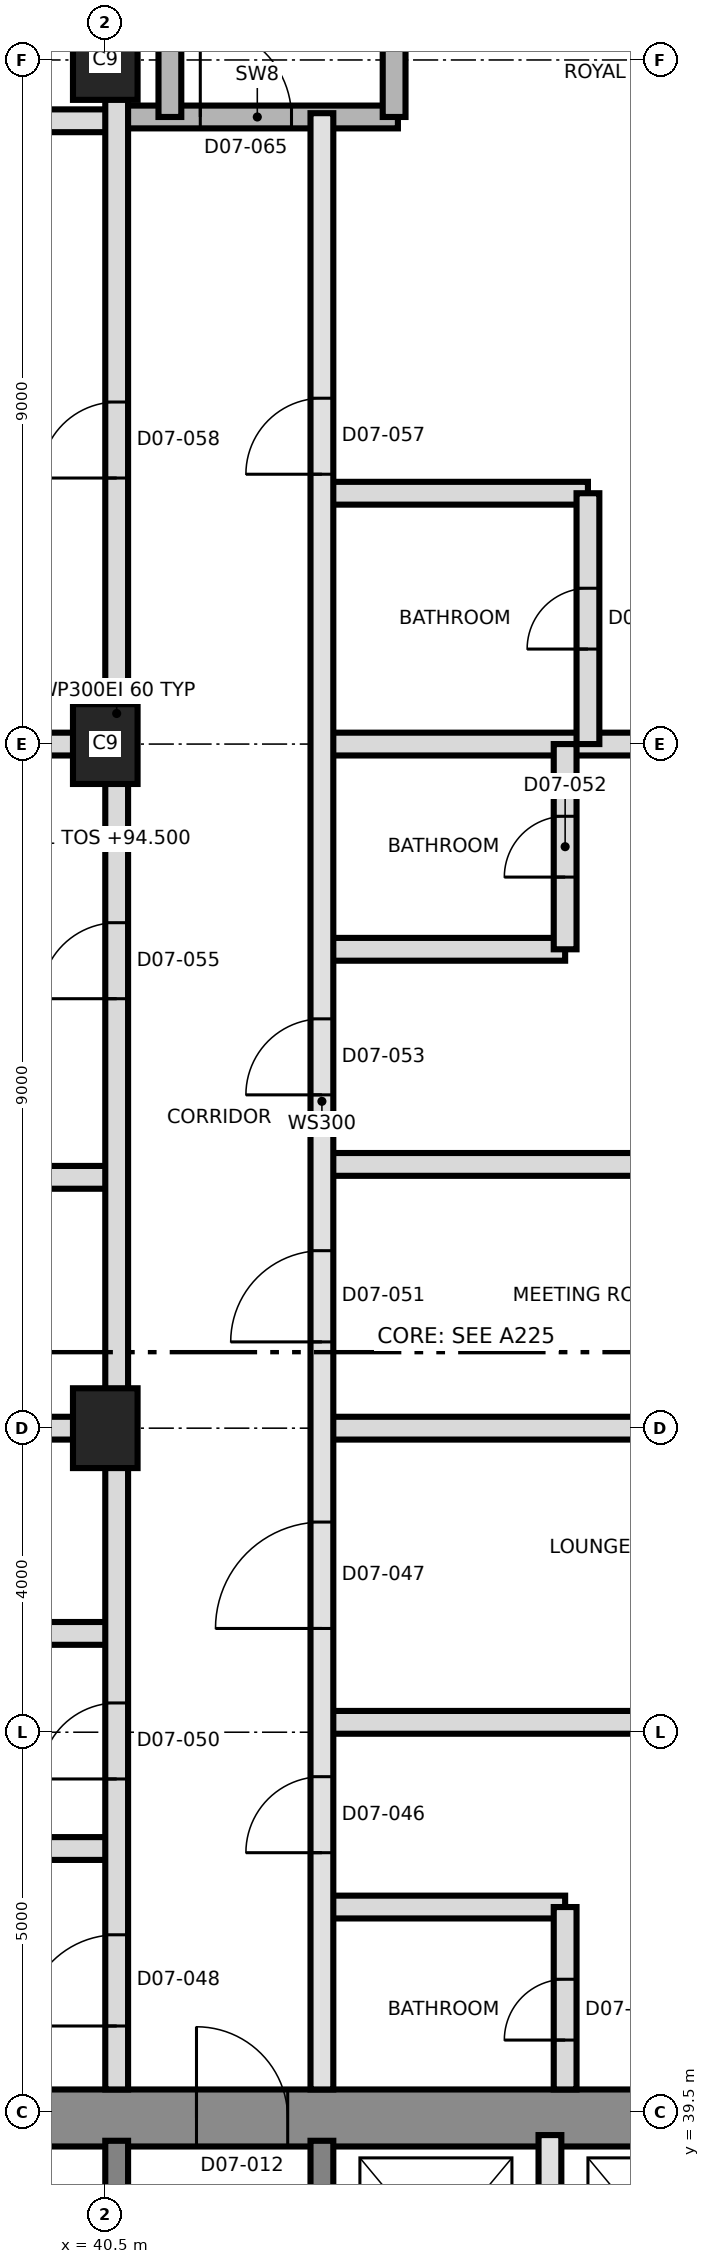
"""IFC4 building model, lengths in metres.
Left out: names, types, materials, properties, quantities, classifications, styles, units other than length and angle.
Written with IfcOpenShell. Run it as: python <this file> out.ifc"""

import sys

from ifc_helpers import new_model, si_unit, direction, frame, frame_2d, origin, origin_2d, place, context, subcontext, project, spatial, rectangle, extrude, element, fill, save


model = new_model("IFC4")
c1 = context("Model", 3, precision=1e-05, world=origin(), true_north=direction((0.0, 1.0)))
c2 = subcontext(c1, "Body", "Model", "MODEL_VIEW")
j1 = project(units=[si_unit("LENGTHUNIT", "METRE"), si_unit("PLANEANGLEUNIT", "RADIAN")], contexts=[c1])
p1 = place(None, origin())
s1 = spatial("IfcSite", under=j1, at=p1, CompositionType="ELEMENT")
p2 = place(p1, origin())
s2 = spatial("IfcBuilding", under=s1, at=p2, CompositionType="ELEMENT")
p3 = place(p2, frame((0.0, 0.0, 94.5)))
s3 = spatial("IfcBuildingStorey", under=s2, at=p3, CompositionType="ELEMENT", Elevation=94.5)
p4 = place(p3, frame((31.125, 39.425, 0.0), z_axis=(0.0, 0.0, 1.0), x_axis=(1.0, 0.0, 0.0)))
e1 = element("IfcWall", 1, at=p4, inside=s3, PredefinedType="SHEAR", context=c2, shape_type="SweptSolid", body=[
    extrude(rectangle(XDim=27.0, YDim=0.75, at=frame_2d((13.5, 0.0))), origin(), (0.0, 0.0, 1.0), 3.7),
])
p5 = place(p4, frame((10.575, 0.0, 0.0)))
e2 = element("IfcOpeningElement", 2, at=p5, cuts=e1, PredefinedType="OPENING", context=c2, shape_type="SweptSolid", body=[
    extrude(rectangle(XDim=1.2, YDim=2.1, at=frame_2d((0.6, 1.05))), frame((0.0, 0.385, 0.0), z_axis=(0.0, -1.0, 0.0), x_axis=(1.0, 0.0, 0.0)), (0.0, 0.0, 1.0), 0.77),
])
for number, where, z_axis, x_axis in (
    (3, (40.65, 33.5, 0.0), (0.0, 0.0, 1.0), (0.0, 1.0, 0.0)),
    (4, (43.35, 33.5, 0.0), (0.0, 0.0, 1.0), (0.0, 1.0, 0.0)),
):
    element("IfcWall", number, at=place(p3, frame(where, z_axis=z_axis, x_axis=x_axis)), inside=s3, PredefinedType="SHEAR", context=c2, shape_type="SweptSolid", body=[
        extrude(rectangle(XDim=5.625, YDim=0.3, at=frame_2d((2.812, 0.0))), origin(), (0.0, 0.0, 1.0), 3.7),
    ])
for number, where, z_axis, x_axis in (
    (5, (40.5, 48.5, 0.0), (0.0, 0.0, 1.0), (0.0, 1.0, 0.0)),
    (6, (40.5, 57.5, 0.0), (0.0, 0.0, 1.0), (0.0, 1.0, 0.0)),
    (7, (40.5, 66.5, 0.0), (0.0, 0.0, 1.0), (0.0, 1.0, 0.0)),
):
    element("IfcColumn", number, at=place(p3, frame(where, z_axis=z_axis, x_axis=x_axis)), inside=s3, PredefinedType="COLUMN", context=c2, shape_type="SweptSolid", body=[
        extrude(rectangle(XDim=1.05, YDim=0.85, at=origin_2d()), origin(), (0.0, 0.0, 1.0), 3.7),
    ])
p6 = place(p3, frame((46.35, 36.2, 0.0), z_axis=(0.0, 0.0, 1.0), x_axis=(0.0, 1.0, 0.0)))
e8 = element("IfcWall", 8, at=p6, inside=s3, PredefinedType="SOLIDWALL", context=c2, shape_type="SweptSolid", body=[
    extrude(rectangle(XDim=3.0, YDim=0.3, at=frame_2d((1.5, 0.0))), origin(), (0.0, 0.0, 1.0), 3.4),
])
p7 = place(p3, frame((43.35, 42.2, 0.0), z_axis=(0.0, 0.0, 1.0), x_axis=(1.0, 0.0, 0.0)))
e9 = element("IfcWall", 9, at=p7, inside=s3, PredefinedType="PARTITIONING", context=c2, shape_type="SweptSolid", body=[
    extrude(rectangle(XDim=3.2, YDim=0.3, at=frame_2d((1.6, 0.0))), origin(), (0.0, 0.0, 1.0), 3.4),
])
p8 = place(p3, frame((30.995, 42.97, 0.0), z_axis=(0.0, 0.0, 1.0), x_axis=(1.0, 0.0, 0.0)))
e10 = element("IfcWall", 10, at=p8, inside=s3, PredefinedType="PARTITIONING", context=c2, shape_type="SweptSolid", body=[
    extrude(rectangle(XDim=9.655, YDim=0.3, at=frame_2d((4.827, 0.0))), origin(), (0.0, 0.0, 1.0), 3.35),
])
p9 = place(p3, frame((43.35, 44.63, 0.0), z_axis=(0.0, 0.0, 1.0), x_axis=(1.0, 0.0, 0.0)))
e11 = element("IfcWall", 11, at=p9, inside=s3, PredefinedType="PARTITIONING", context=c2, shape_type="SweptSolid", body=[
    extrude(rectangle(XDim=7.032, YDim=0.3, at=frame_2d((3.516, 0.0))), origin(), (0.0, 0.0, 1.0), 3.35),
])
p10 = place(p3, frame((37.45, 45.8, 0.0), z_axis=(0.0, 0.0, 1.0), x_axis=(1.0, 0.0, 0.0)))
e12 = element("IfcWall", 12, at=p10, inside=s3, PredefinedType="PARTITIONING", context=c2, shape_type="SweptSolid", body=[
    extrude(rectangle(XDim=3.2, YDim=0.3, at=frame_2d((1.6, 0.0))), origin(), (0.0, 0.0, 1.0), 3.4),
])
p11 = place(p3, frame((30.995, 48.5, 0.0), z_axis=(0.0, 0.0, 1.0), x_axis=(1.0, 0.0, 0.0)))
e13 = element("IfcWall", 13, at=p11, inside=s3, PredefinedType="PARTITIONING", context=c2, shape_type="SweptSolid", body=[
    extrude(rectangle(XDim=9.655, YDim=0.3, at=frame_2d((4.827, 0.0))), origin(), (0.0, 0.0, 1.0), 3.35),
])
p12 = place(p3, frame((43.35, 48.5, 0.0), z_axis=(0.0, 0.0, 1.0), x_axis=(1.0, 0.0, 0.0)))
e14 = element("IfcWall", 14, at=p12, inside=s3, PredefinedType="PARTITIONING", context=c2, shape_type="SweptSolid", body=[
    extrude(rectangle(XDim=6.655, YDim=0.3, at=frame_2d((3.327, 0.0))), origin(), (0.0, 0.0, 1.0), 3.35),
])
p13 = place(p3, frame((37.15, 51.8, 0.0), z_axis=(0.0, 0.0, 1.0), x_axis=(1.0, 0.0, 0.0)))
e15 = element("IfcWall", 15, at=p13, inside=s3, PredefinedType="PARTITIONING", context=c2, shape_type="SweptSolid", body=[
    extrude(rectangle(XDim=3.5, YDim=0.3, at=frame_2d((1.75, 0.0))), origin(), (0.0, 0.0, 1.0), 3.4),
])
p14 = place(p3, frame((43.35, 51.97, 0.0), z_axis=(0.0, 0.0, 1.0), x_axis=(1.0, 0.0, 0.0)))
e16 = element("IfcWall", 16, at=p14, inside=s3, PredefinedType="PARTITIONING", context=c2, shape_type="SweptSolid", body=[
    extrude(rectangle(XDim=6.835, YDim=0.3, at=frame_2d((3.417, 0.0))), origin(), (0.0, 0.0, 1.0), 3.35),
])
p15 = place(p3, frame((43.35, 54.8, 0.0), z_axis=(0.0, 0.0, 1.0), x_axis=(1.0, 0.0, 0.0)))
e17 = element("IfcWall", 17, at=p15, inside=s3, PredefinedType="PARTITIONING", context=c2, shape_type="SweptSolid", body=[
    extrude(rectangle(XDim=3.2, YDim=0.3, at=frame_2d((1.6, 0.0))), origin(), (0.0, 0.0, 1.0), 3.4),
])
p16 = place(p3, frame((30.995, 57.5, 0.0), z_axis=(0.0, 0.0, 1.0), x_axis=(1.0, 0.0, 0.0)))
e18 = element("IfcWall", 18, at=p16, inside=s3, PredefinedType="PARTITIONING", context=c2, shape_type="SweptSolid", body=[
    extrude(rectangle(XDim=9.655, YDim=0.3, at=frame_2d((4.827, 0.0))), origin(), (0.0, 0.0, 1.0), 3.35),
])
p17 = place(p3, frame((43.35, 57.5, 0.0), z_axis=(0.0, 0.0, 1.0), x_axis=(1.0, 0.0, 0.0)))
e19 = element("IfcWall", 19, at=p17, inside=s3, PredefinedType="PARTITIONING", context=c2, shape_type="SweptSolid", body=[
    extrude(rectangle(XDim=6.655, YDim=0.3, at=frame_2d((3.327, 0.0))), origin(), (0.0, 0.0, 1.0), 3.35),
])
p18 = place(p3, frame((43.35, 60.8, 0.0), z_axis=(0.0, 0.0, 1.0), x_axis=(1.0, 0.0, 0.0)))
e20 = element("IfcWall", 20, at=p18, inside=s3, PredefinedType="PARTITIONING", context=c2, shape_type="SweptSolid", body=[
    extrude(rectangle(XDim=3.5, YDim=0.3, at=frame_2d((1.75, 0.0))), origin(), (0.0, 0.0, 1.0), 3.4),
])
p19 = place(p3, frame((30.995, 65.7, 0.0), z_axis=(0.0, 0.0, 1.0), x_axis=(1.0, 0.0, 0.0)))
e21 = element("IfcWall", 21, at=p19, inside=s3, PredefinedType="PARTITIONING", context=c2, shape_type="SweptSolid", body=[
    extrude(rectangle(XDim=9.655, YDim=0.3, at=frame_2d((4.827, 0.0))), origin(), (0.0, 0.0, 1.0), 3.35),
])
p20 = place(p19, frame((4.005, 0.0, 0.0)))
e22 = element("IfcOpeningElement", 22, at=p20, cuts=e21, PredefinedType="OPENING", context=c2, shape_type="SweptSolid", body=[
    extrude(rectangle(XDim=1.0, YDim=2.1, at=frame_2d((0.5, 1.05))), frame((0.0, 0.16, 0.0), z_axis=(0.0, -1.0, 0.0), x_axis=(1.0, 0.0, 0.0)), (0.0, 0.0, 1.0), 0.32),
])
p21 = place(p3, frame((40.65, 65.75, 0.0), z_axis=(0.0, 0.0, 1.0), x_axis=(1.0, 0.0, 0.0)))
e23 = element("IfcWall", 23, at=p21, inside=s3, PredefinedType="SHEAR", context=c2, shape_type="SweptSolid", body=[
    extrude(rectangle(XDim=3.7, YDim=0.3, at=frame_2d((1.85, 0.0))), origin(), (0.0, 0.0, 1.0), 3.4),
])
p22 = place(p21, frame((1.1, 0.0, 0.0)))
e24 = element("IfcOpeningElement", 24, at=p22, cuts=e23, PredefinedType="OPENING", context=c2, shape_type="SweptSolid", body=[
    extrude(rectangle(XDim=1.2, YDim=2.1, at=frame_2d((0.6, 1.05))), frame((0.0, 0.16, 0.0), z_axis=(0.0, -1.0, 0.0), x_axis=(1.0, 0.0, 0.0)), (0.0, 0.0, 1.0), 0.32),
])
p23 = place(p3, frame((40.65, 39.8, 0.0), z_axis=(0.0, 0.0, 1.0), x_axis=(0.0, 1.0, 0.0)))
e25 = element("IfcWall", 25, at=p23, inside=s3, PredefinedType="PARTITIONING", context=c2, shape_type="SweptSolid", body=[
    extrude(rectangle(XDim=36.205, YDim=0.3, at=frame_2d((18.103, 0.0))), origin(), (0.0, 0.0, 1.0), 3.35),
])
p24 = place(p23, frame((0.835, 0.0, 0.0)))
e26 = element("IfcOpeningElement", 26, at=p24, cuts=e25, PredefinedType="OPENING", context=c2, shape_type="SweptSolid", body=[
    extrude(rectangle(XDim=1.2, YDim=2.1, at=frame_2d((0.6, 1.05))), frame((0.0, 0.16, 0.0), z_axis=(0.0, -1.0, 0.0), x_axis=(1.0, 0.0, 0.0)), (0.0, 0.0, 1.0), 0.32),
])
p25 = place(p23, frame((4.085, 0.0, 0.0)))
e27 = element("IfcOpeningElement", 27, at=p25, cuts=e25, PredefinedType="OPENING", context=c2, shape_type="SweptSolid", body=[
    extrude(rectangle(XDim=1.0, YDim=2.1, at=frame_2d((0.5, 1.05))), frame((0.0, 0.16, 0.0), z_axis=(0.0, -1.0, 0.0), x_axis=(1.0, 0.0, 0.0)), (0.0, 0.0, 1.0), 0.32),
])
p26 = place(p23, frame((14.35, 0.0, 0.0)))
e28 = element("IfcOpeningElement", 28, at=p26, cuts=e25, PredefinedType="OPENING", context=c2, shape_type="SweptSolid", body=[
    extrude(rectangle(XDim=1.0, YDim=2.4, at=frame_2d((0.5, 1.2))), frame((0.0, 0.16, 0.0), z_axis=(0.0, -1.0, 0.0), x_axis=(1.0, 0.0, 0.0)), (0.0, 0.0, 1.0), 0.32),
])
p27 = place(p23, frame((21.2, 0.0, 0.0)))
e29 = element("IfcOpeningElement", 29, at=p27, cuts=e25, PredefinedType="OPENING", context=c2, shape_type="SweptSolid", body=[
    extrude(rectangle(XDim=1.0, YDim=2.4, at=frame_2d((0.5, 1.2))), frame((0.0, 0.16, 0.0), z_axis=(0.0, -1.0, 0.0), x_axis=(1.0, 0.0, 0.0)), (0.0, 0.0, 1.0), 0.32),
])
p28 = place(p3, frame((41.35, 65.75, 0.0), z_axis=(0.0, 0.0, 1.0), x_axis=(0.0, 1.0, 0.0)))
e30 = element("IfcWall", 30, at=p28, inside=s3, PredefinedType="SHEAR", context=c2, shape_type="SweptSolid", body=[
    extrude(rectangle(XDim=8.85, YDim=0.3, at=frame_2d((4.425, 0.0))), origin(), (0.0, 0.0, 1.0), 3.4),
])
p29 = place(p3, frame((43.35, 39.8, 0.0), z_axis=(0.0, 0.0, 1.0), x_axis=(0.0, 1.0, 0.0)))
e31 = element("IfcWall", 31, at=p29, inside=s3, PredefinedType="SOLIDWALL", context=c2, shape_type="SweptSolid", body=[
    extrude(rectangle(XDim=26.0, YDim=0.3, at=frame_2d((13.0, 0.0))), origin(), (0.0, 0.0, 1.0), 3.4),
])
p30 = place(p29, frame((3.115, 0.0, 0.0)))
e32 = element("IfcOpeningElement", 32, at=p30, cuts=e31, PredefinedType="OPENING", context=c2, shape_type="SweptSolid", body=[
    extrude(rectangle(XDim=1.0, YDim=2.1, at=frame_2d((0.5, 1.05))), frame((0.0, 0.16, 0.0), z_axis=(0.0, -1.0, 0.0), x_axis=(1.0, 0.0, 0.0)), (0.0, 0.0, 1.0), 0.32),
])
p31 = place(p29, frame((6.065, 0.0, 0.0)))
e33 = element("IfcOpeningElement", 33, at=p31, cuts=e31, PredefinedType="OPENING", context=c2, shape_type="SweptSolid", body=[
    extrude(rectangle(XDim=1.4, YDim=2.1, at=frame_2d((0.7, 1.05))), frame((0.0, 0.16, 0.0), z_axis=(0.0, -1.0, 0.0), x_axis=(1.0, 0.0, 0.0)), (0.0, 0.0, 1.0), 0.32),
])
p32 = place(p29, frame((9.835, 0.0, 0.0)))
e34 = element("IfcOpeningElement", 34, at=p32, cuts=e31, PredefinedType="OPENING", context=c2, shape_type="SweptSolid", body=[
    extrude(rectangle(XDim=1.2, YDim=2.1, at=frame_2d((0.6, 1.05))), frame((0.0, 0.16, 0.0), z_axis=(0.0, -1.0, 0.0), x_axis=(1.0, 0.0, 0.0)), (0.0, 0.0, 1.0), 0.32),
])
p33 = place(p29, frame((13.085, 0.0, 0.0)))
e35 = element("IfcOpeningElement", 35, at=p33, cuts=e31, PredefinedType="OPENING", context=c2, shape_type="SweptSolid", body=[
    extrude(rectangle(XDim=1.0, YDim=2.1, at=frame_2d((0.5, 1.05))), frame((0.0, 0.16, 0.0), z_axis=(0.0, -1.0, 0.0), x_axis=(1.0, 0.0, 0.0)), (0.0, 0.0, 1.0), 0.32),
])
p34 = place(p29, frame((21.25, 0.0, 0.0)))
e36 = element("IfcOpeningElement", 36, at=p34, cuts=e31, PredefinedType="OPENING", context=c2, shape_type="SweptSolid", body=[
    extrude(rectangle(XDim=1.0, YDim=2.4, at=frame_2d((0.5, 1.2))), frame((0.0, 0.16, 0.0), z_axis=(0.0, -1.0, 0.0), x_axis=(1.0, 0.0, 0.0)), (0.0, 0.0, 1.0), 0.32),
])
p35 = place(p3, frame((44.3, 65.75, 0.0), z_axis=(0.0, 0.0, 1.0), x_axis=(0.0, 1.0, 0.0)))
e37 = element("IfcWall", 37, at=p35, inside=s3, PredefinedType="SHEAR", context=c2, shape_type="SweptSolid", body=[
    extrude(rectangle(XDim=8.85, YDim=0.3, at=frame_2d((4.425, 0.0))), origin(), (0.0, 0.0, 1.0), 3.4),
])
p36 = place(p3, frame((46.55, 39.8, 0.0), z_axis=(0.0, 0.0, 1.0), x_axis=(0.0, 1.0, 0.0)))
e38 = element("IfcWall", 38, at=p36, inside=s3, PredefinedType="PARTITIONING", context=c2, shape_type="SweptSolid", body=[
    extrude(rectangle(XDim=2.4, YDim=0.3, at=frame_2d((1.2, 0.0))), origin(), (0.0, 0.0, 1.0), 3.4),
])
p37 = place(p36, frame((0.65, 0.0, 0.0)))
e39 = element("IfcOpeningElement", 39, at=p37, cuts=e38, PredefinedType="OPENING", context=c2, shape_type="SweptSolid", body=[
    extrude(rectangle(XDim=0.8, YDim=2.1, at=frame_2d((0.4, 1.05))), frame((0.0, 0.16, 0.0), z_axis=(0.0, -1.0, 0.0), x_axis=(1.0, 0.0, 0.0)), (0.0, 0.0, 1.0), 0.32),
])
p38 = place(p3, frame((46.55, 54.8, 0.0), z_axis=(0.0, 0.0, 1.0), x_axis=(0.0, 1.0, 0.0)))
e40 = element("IfcWall", 40, at=p38, inside=s3, PredefinedType="PARTITIONING", context=c2, shape_type="SweptSolid", body=[
    extrude(rectangle(XDim=2.7, YDim=0.3, at=frame_2d((1.35, 0.0))), origin(), (0.0, 0.0, 1.0), 3.4),
])
p39 = place(p38, frame((0.95, 0.0, 0.0)))
e41 = element("IfcOpeningElement", 41, at=p39, cuts=e40, PredefinedType="OPENING", context=c2, shape_type="SweptSolid", body=[
    extrude(rectangle(XDim=0.8, YDim=2.1, at=frame_2d((0.4, 1.05))), frame((0.0, 0.16, 0.0), z_axis=(0.0, -1.0, 0.0), x_axis=(1.0, 0.0, 0.0)), (0.0, 0.0, 1.0), 0.32),
])
p40 = place(p3, frame((46.85, 57.5, 0.0), z_axis=(0.0, 0.0, 1.0), x_axis=(0.0, 1.0, 0.0)))
e42 = element("IfcWall", 42, at=p40, inside=s3, PredefinedType="PARTITIONING", context=c2, shape_type="SweptSolid", body=[
    extrude(rectangle(XDim=3.3, YDim=0.3, at=frame_2d((1.65, 0.0))), origin(), (0.0, 0.0, 1.0), 3.4),
])
p41 = place(p40, frame((1.25, 0.0, 0.0)))
e43 = element("IfcOpeningElement", 43, at=p41, cuts=e42, PredefinedType="OPENING", context=c2, shape_type="SweptSolid", body=[
    extrude(rectangle(XDim=0.8, YDim=2.1, at=frame_2d((0.4, 1.05))), frame((0.0, 0.16, 0.0), z_axis=(0.0, -1.0, 0.0), x_axis=(1.0, 0.0, 0.0)), (0.0, 0.0, 1.0), 0.32),
])
p42 = place(p5, origin())
e44 = element("IfcDoor", 44, at=p42, inside=s3, OperationType="SINGLE_SWING_RIGHT", PredefinedType="DOOR", context=c2, shape_type="SweptSolid", body=[
    extrude(rectangle(XDim=1.2, YDim=2.1, at=frame_2d((0.6, 1.05))), frame((0.0, 0.025, 0.0), z_axis=(0.0, -1.0, 0.0), x_axis=(1.0, 0.0, 0.0)), (0.0, 0.0, 1.0), 0.05),
])
fill(e2, e44)
p43 = place(p37, origin())
e45 = element("IfcDoor", 45, at=p43, inside=s3, OperationType="SINGLE_SWING_RIGHT", PredefinedType="DOOR", context=c2, shape_type="SweptSolid", body=[
    extrude(rectangle(XDim=0.8, YDim=2.1, at=frame_2d((0.4, 1.05))), frame((0.0, 0.025, 0.0), z_axis=(0.0, -1.0, 0.0), x_axis=(1.0, 0.0, 0.0)), (0.0, 0.0, 1.0), 0.05),
])
fill(e39, e45)
p44 = place(p30, origin())
e46 = element("IfcDoor", 46, at=p44, inside=s3, OperationType="SINGLE_SWING_LEFT", PredefinedType="DOOR", context=c2, shape_type="SweptSolid", body=[
    extrude(rectangle(XDim=1.0, YDim=2.1, at=frame_2d((0.5, 1.05))), frame((0.0, 0.025, 0.0), z_axis=(0.0, -1.0, 0.0), x_axis=(1.0, 0.0, 0.0)), (0.0, 0.0, 1.0), 0.05),
])
fill(e32, e46)
p45 = place(p31, origin())
e47 = element("IfcDoor", 47, at=p45, inside=s3, OperationType="SINGLE_SWING_LEFT", PredefinedType="DOOR", context=c2, shape_type="SweptSolid", body=[
    extrude(rectangle(XDim=1.4, YDim=2.1, at=frame_2d((0.7, 1.05))), frame((0.0, 0.025, 0.0), z_axis=(0.0, -1.0, 0.0), x_axis=(1.0, 0.0, 0.0)), (0.0, 0.0, 1.0), 0.05),
])
fill(e33, e47)
p46 = place(p24, origin())
e48 = element("IfcDoor", 48, at=p46, inside=s3, OperationType="SINGLE_SWING_LEFT", PredefinedType="DOOR", context=c2, shape_type="SweptSolid", body=[
    extrude(rectangle(XDim=1.2, YDim=2.1, at=frame_2d((0.6, 1.05))), frame((0.0, 0.025, 0.0), z_axis=(0.0, -1.0, 0.0), x_axis=(1.0, 0.0, 0.0)), (0.0, 0.0, 1.0), 0.05),
])
fill(e26, e48)
p47 = place(p25, origin())
e49 = element("IfcDoor", 49, at=p47, inside=s3, OperationType="SINGLE_SWING_RIGHT", PredefinedType="DOOR", context=c2, shape_type="SweptSolid", body=[
    extrude(rectangle(XDim=1.0, YDim=2.1, at=frame_2d((0.5, 1.05))), frame((0.0, 0.025, 0.0), z_axis=(0.0, -1.0, 0.0), x_axis=(1.0, 0.0, 0.0)), (0.0, 0.0, 1.0), 0.05),
])
fill(e27, e49)
p48 = place(p32, origin())
e50 = element("IfcDoor", 50, at=p48, inside=s3, OperationType="SINGLE_SWING_LEFT", PredefinedType="DOOR", context=c2, shape_type="SweptSolid", body=[
    extrude(rectangle(XDim=1.2, YDim=2.1, at=frame_2d((0.6, 1.05))), frame((0.0, 0.025, 0.0), z_axis=(0.0, -1.0, 0.0), x_axis=(1.0, 0.0, 0.0)), (0.0, 0.0, 1.0), 0.05),
])
fill(e34, e50)
p49 = place(p39, origin())
e51 = element("IfcDoor", 51, at=p49, inside=s3, OperationType="SINGLE_SWING_LEFT", PredefinedType="DOOR", context=c2, shape_type="SweptSolid", body=[
    extrude(rectangle(XDim=0.8, YDim=2.1, at=frame_2d((0.4, 1.05))), frame((0.0, 0.025, 0.0), z_axis=(0.0, -1.0, 0.0), x_axis=(1.0, 0.0, 0.0)), (0.0, 0.0, 1.0), 0.05),
])
fill(e41, e51)
p50 = place(p33, origin())
e52 = element("IfcDoor", 52, at=p50, inside=s3, OperationType="SINGLE_SWING_RIGHT", PredefinedType="DOOR", context=c2, shape_type="SweptSolid", body=[
    extrude(rectangle(XDim=1.0, YDim=2.1, at=frame_2d((0.5, 1.05))), frame((0.0, 0.025, 0.0), z_axis=(0.0, -1.0, 0.0), x_axis=(1.0, 0.0, 0.0)), (0.0, 0.0, 1.0), 0.05),
])
fill(e35, e52)
p51 = place(p26, origin())
e53 = element("IfcDoor", 53, at=p51, inside=s3, OperationType="SINGLE_SWING_LEFT", PredefinedType="DOOR", context=c2, shape_type="SweptSolid", body=[
    extrude(rectangle(XDim=1.0, YDim=2.4, at=frame_2d((0.5, 1.2))), frame((0.0, 0.025, 0.0), z_axis=(0.0, -1.0, 0.0), x_axis=(1.0, 0.0, 0.0)), (0.0, 0.0, 1.0), 0.05),
])
fill(e28, e53)
p52 = place(p41, origin())
e54 = element("IfcDoor", 54, at=p52, inside=s3, OperationType="SINGLE_SWING_LEFT", PredefinedType="DOOR", context=c2, shape_type="SweptSolid", body=[
    extrude(rectangle(XDim=0.8, YDim=2.1, at=frame_2d((0.4, 1.05))), frame((0.0, 0.025, 0.0), z_axis=(0.0, -1.0, 0.0), x_axis=(1.0, 0.0, 0.0)), (0.0, 0.0, 1.0), 0.05),
])
fill(e43, e54)
p53 = place(p34, origin())
e55 = element("IfcDoor", 55, at=p53, inside=s3, OperationType="SINGLE_SWING_LEFT", PredefinedType="DOOR", context=c2, shape_type="SweptSolid", body=[
    extrude(rectangle(XDim=1.0, YDim=2.4, at=frame_2d((0.5, 1.2))), frame((0.0, 0.025, 0.0), z_axis=(0.0, -1.0, 0.0), x_axis=(1.0, 0.0, 0.0)), (0.0, 0.0, 1.0), 0.05),
])
fill(e36, e55)
p54 = place(p27, origin())
e56 = element("IfcDoor", 56, at=p54, inside=s3, OperationType="SINGLE_SWING_RIGHT", PredefinedType="DOOR", context=c2, shape_type="SweptSolid", body=[
    extrude(rectangle(XDim=1.0, YDim=2.4, at=frame_2d((0.5, 1.2))), frame((0.0, 0.025, 0.0), z_axis=(0.0, -1.0, 0.0), x_axis=(1.0, 0.0, 0.0)), (0.0, 0.0, 1.0), 0.05),
])
fill(e29, e56)
p55 = place(p22, origin())
e57 = element("IfcDoor", 57, at=p55, inside=s3, OperationType="SINGLE_SWING_RIGHT", PredefinedType="DOOR", context=c2, shape_type="SweptSolid", body=[
    extrude(rectangle(XDim=1.2, YDim=2.1, at=frame_2d((0.6, 1.05))), frame((0.0, 0.025, 0.0), z_axis=(0.0, -1.0, 0.0), x_axis=(1.0, 0.0, 0.0)), (0.0, 0.0, 1.0), 0.05),
])
fill(e24, e57)
save(model, sys.argv[1])
